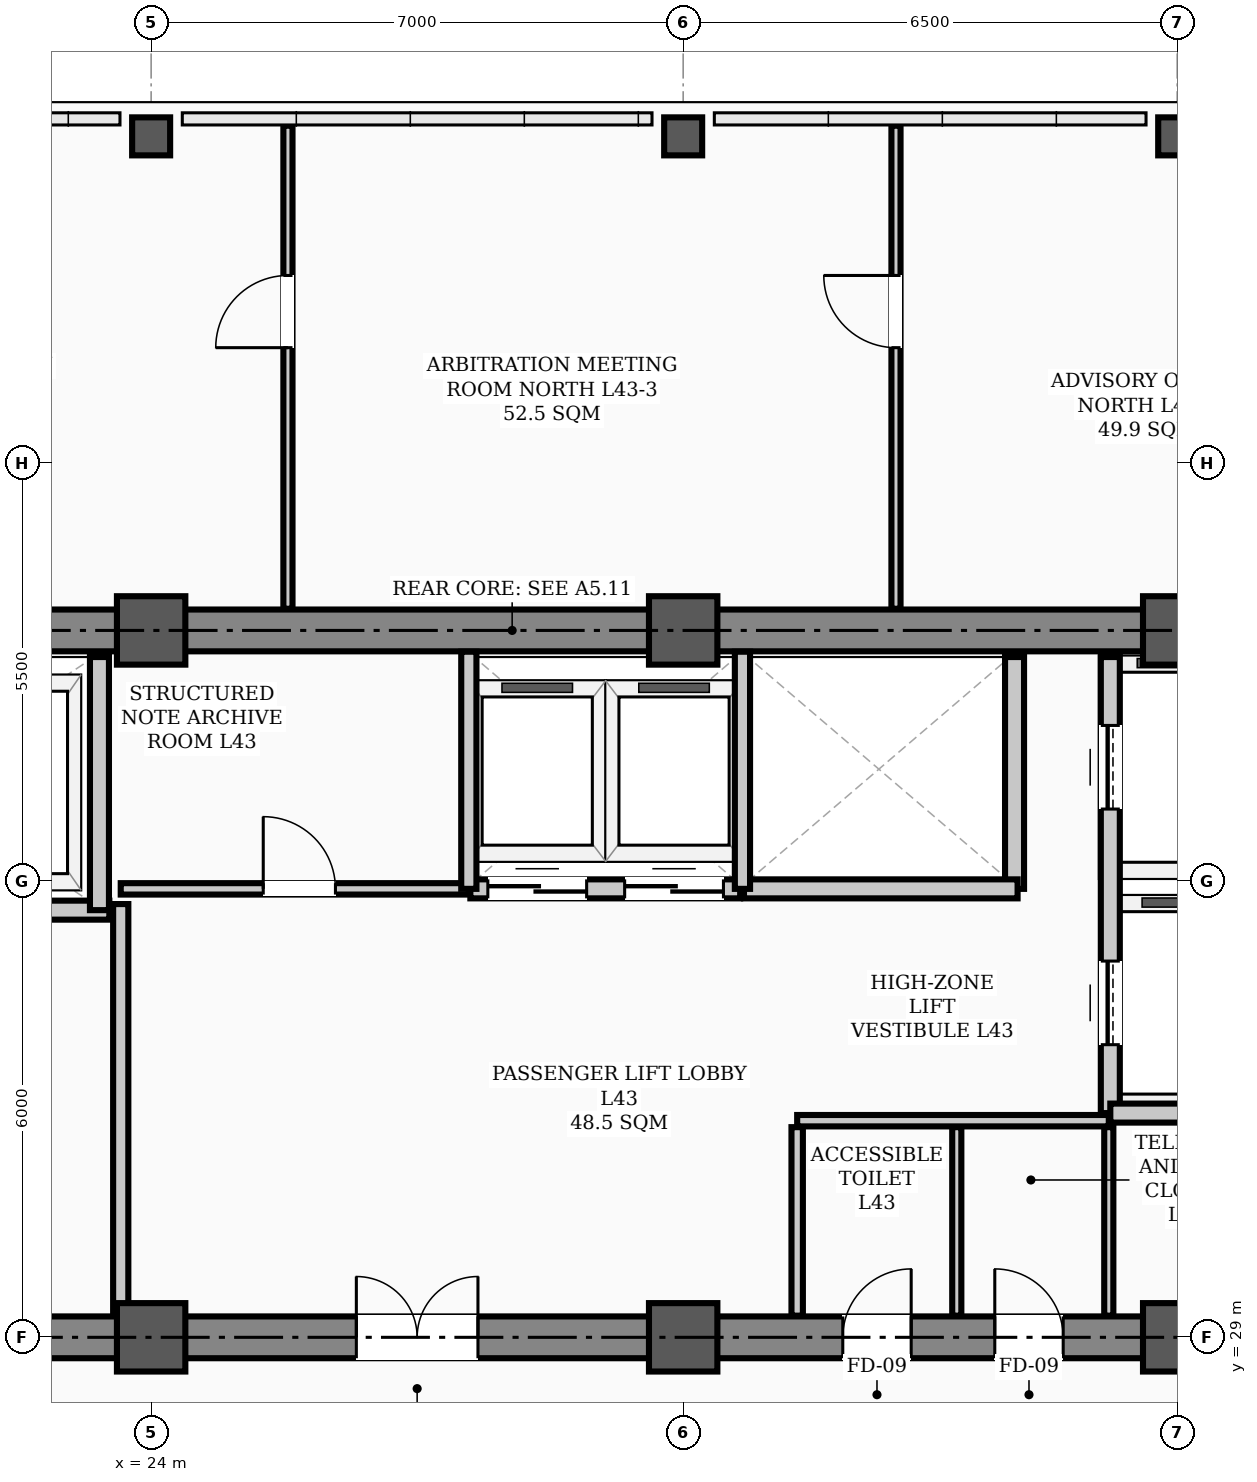
"""IFC4 building model, lengths in metres.
Left out: names, types, materials, properties, quantities, classifications, styles, units other than length and angle.
Written with IfcOpenShell. Run it as: python <this file> out.ifc"""

import sys

from ifc_helpers import new_model, si_unit, direction, frame, frame_2d, origin, origin_2d, place, context, subcontext, project, spatial, rectangle, hollow_rectangle, extrude, element, fill, save


model = new_model("IFC4")
c1 = context("Model", 3, precision=1e-05, world=origin(), true_north=direction((0.0, 1.0)))
c2 = subcontext(c1, "Body", "Model", "MODEL_VIEW")
j1 = project(units=[si_unit("LENGTHUNIT", "METRE"), si_unit("PLANEANGLEUNIT", "RADIAN")], contexts=[c1])
p1 = place(None, origin())
s1 = spatial("IfcSite", under=j1, at=p1, CompositionType="ELEMENT")
p2 = place(p1, origin())
s2 = spatial("IfcBuilding", under=s1, at=p2, CompositionType="ELEMENT")
p3 = place(p2, frame((0.0, 0.0, 173.4)))
s3 = spatial("IfcBuildingStorey", under=s2, at=p3, CompositionType="ELEMENT", Elevation=173.4)
for number, where, z_axis, x_axis in (
    (1, (24.0, 29.0, 0.0), (0.0, 0.0, 1.0), (1.0, 0.0, 0.0)),
    (2, (24.0, 38.3, 0.0), (0.0, 0.0, 1.0), (1.0, 0.0, 0.0)),
    (3, (31.0, 29.0, 0.0), (0.0, 0.0, 1.0), (1.0, 0.0, 0.0)),
    (4, (31.0, 38.3, 0.0), (0.0, 0.0, 1.0), (1.0, 0.0, 0.0)),
    (5, (37.5, 29.0, 0.0), (0.0, 0.0, 1.0), (1.0, 0.0, 0.0)),
    (6, (37.5, 38.3, 0.0), (0.0, 0.0, 1.0), (1.0, 0.0, 0.0)),
):
    element("IfcColumn", number, at=place(p3, frame(where, z_axis=z_axis, x_axis=x_axis)), inside=s3, PredefinedType="COLUMN", context=c2, shape_type="SweptSolid", body=[
        extrude(hollow_rectangle(XDim=0.9, YDim=0.9, WallThickness=0.035, InnerFilletRadius=0.017, OuterFilletRadius=0.052, at=origin_2d()), origin(), (0.0, 0.0, 1.0), 3.9),
    ])
for number, where, z_axis, x_axis in (
    (7, (24.0, 44.8, 0.0), (0.0, 0.0, 1.0), (1.0, 0.0, 0.0)),
    (8, (31.0, 44.8, 0.0), (0.0, 0.0, 1.0), (1.0, 0.0, 0.0)),
    (9, (37.5, 44.8, 0.0), (0.0, 0.0, 1.0), (1.0, 0.0, 0.0)),
):
    element("IfcColumn", number, at=place(p3, frame(where, z_axis=z_axis, x_axis=x_axis)), inside=s3, PredefinedType="COLUMN", context=c2, shape_type="SweptSolid", body=[
        extrude(hollow_rectangle(XDim=0.5, YDim=0.5, WallThickness=0.024, InnerFilletRadius=0.012, OuterFilletRadius=0.036, at=origin_2d()), origin(), (0.0, 0.0, 1.0), 3.9),
    ])
p4 = place(p3, frame((13.5, 29.0, 0.0), z_axis=(0.0, 0.0, 1.0), x_axis=(1.0, 0.0, 0.0)))
e10 = element("IfcWall", 10, at=p4, inside=s3, PredefinedType="SHEAR", context=c2, shape_type="SweptSolid", body=[
    extrude(rectangle(XDim=30.5, YDim=0.55, at=frame_2d((15.25, 0.0))), origin(), (0.0, 0.0, 1.0), 3.72),
])
p5 = place(p4, frame((1.75, 0.0, 0.0)))
e11 = element("IfcOpeningElement", 11, at=p5, cuts=e10, PredefinedType="OPENING", context=c2, shape_type="SweptSolid", body=[
    extrude(rectangle(XDim=1.1, YDim=2.08, at=frame_2d((0.55, 1.04))), frame((0.0, 0.285, 0.0), z_axis=(0.0, -1.0, 0.0), x_axis=(1.0, 0.0, 0.0)), (0.0, 0.0, 1.0), 0.57),
])
p6 = place(p4, frame((26.7, 0.0, 0.0)))
e12 = element("IfcOpeningElement", 12, at=p6, cuts=e10, PredefinedType="OPENING", context=c2, shape_type="SweptSolid", body=[
    extrude(rectangle(XDim=1.1, YDim=2.08, at=frame_2d((0.55, 1.04))), frame((0.0, 0.285, 0.0), z_axis=(0.0, -1.0, 0.0), x_axis=(1.0, 0.0, 0.0)), (0.0, 0.0, 1.0), 0.57),
])
p7 = place(p4, frame((6.8, 0.0, 0.0)))
e13 = element("IfcOpeningElement", 13, at=p7, cuts=e10, PredefinedType="OPENING", context=c2, shape_type="SweptSolid", body=[
    extrude(rectangle(XDim=1.1, YDim=2.08, at=frame_2d((0.55, 1.04))), frame((0.0, 0.285, 0.0), z_axis=(0.0, -1.0, 0.0), x_axis=(1.0, 0.0, 0.0)), (0.0, 0.0, 1.0), 0.57),
])
p8 = place(p4, frame((13.2, 0.0, 0.0)))
e14 = element("IfcOpeningElement", 14, at=p8, cuts=e10, PredefinedType="OPENING", context=c2, shape_type="SweptSolid", body=[
    extrude(rectangle(XDim=1.6, YDim=2.08, at=frame_2d((0.8, 1.04))), frame((0.0, 0.285, 0.0), z_axis=(0.0, -1.0, 0.0), x_axis=(1.0, 0.0, 0.0)), (0.0, 0.0, 1.0), 0.57),
])
p9 = place(p4, frame((19.6, 0.0, 0.0)))
e15 = element("IfcOpeningElement", 15, at=p9, cuts=e10, PredefinedType="OPENING", context=c2, shape_type="SweptSolid", body=[
    extrude(rectangle(XDim=0.9, YDim=2.08, at=frame_2d((0.45, 1.04))), frame((0.0, 0.285, 0.0), z_axis=(0.0, -1.0, 0.0), x_axis=(1.0, 0.0, 0.0)), (0.0, 0.0, 1.0), 0.57),
])
p10 = place(p4, frame((21.6, 0.0, 0.0)))
e16 = element("IfcOpeningElement", 16, at=p10, cuts=e10, PredefinedType="OPENING", context=c2, shape_type="SweptSolid", body=[
    extrude(rectangle(XDim=0.9, YDim=2.08, at=frame_2d((0.45, 1.04))), frame((0.0, 0.285, 0.0), z_axis=(0.0, -1.0, 0.0), x_axis=(1.0, 0.0, 0.0)), (0.0, 0.0, 1.0), 0.57),
])
p11 = place(p3, frame((13.5, 38.3, 0.0), z_axis=(0.0, 0.0, 1.0), x_axis=(1.0, 0.0, 0.0)))
e17 = element("IfcWall", 17, at=p11, inside=s3, PredefinedType="SHEAR", context=c2, shape_type="SweptSolid", body=[
    extrude(rectangle(XDim=30.5, YDim=0.55, at=frame_2d((15.25, 0.0))), origin(), (0.0, 0.0, 1.0), 3.72),
])
p12 = place(p3, frame((18.1, 34.62, 0.0), z_axis=(0.0, 0.0, 1.0), x_axis=(1.0, 0.0, 0.0)))
e18 = element("IfcWall", 18, at=p12, inside=s3, PredefinedType="STANDARD", context=c2, shape_type="SweptSolid", body=[
    extrude(rectangle(XDim=5.35, YDim=0.25, at=frame_2d((2.675, 0.0))), origin(), (0.0, 0.0, 1.0), 3.72),
])
p13 = place(p12, frame((0.85, 0.0, 0.0)))
e19 = element("IfcOpeningElement", 19, at=p13, cuts=e18, PredefinedType="OPENING", context=c2, shape_type="SweptSolid", body=[
    extrude(rectangle(XDim=1.1, YDim=2.08, at=frame_2d((0.55, 1.04))), frame((0.0, 0.135, 0.0), z_axis=(0.0, -1.0, 0.0), x_axis=(1.0, 0.0, 0.0)), (0.0, 0.0, 1.0), 0.27),
])
p14 = place(p12, frame((3.45, 0.0, 0.0)))
e20 = element("IfcOpeningElement", 20, at=p14, cuts=e18, PredefinedType="OPENING", context=c2, shape_type="SweptSolid", body=[
    extrude(rectangle(XDim=1.1, YDim=2.08, at=frame_2d((0.55, 1.04))), frame((0.0, 0.135, 0.0), z_axis=(0.0, -1.0, 0.0), x_axis=(1.0, 0.0, 0.0)), (0.0, 0.0, 1.0), 0.27),
])
p15 = place(p3, frame((36.62, 31.95, 0.0), z_axis=(0.0, 0.0, 1.0), x_axis=(0.0, 1.0, 0.0)))
e21 = element("IfcWall", 21, at=p15, inside=s3, PredefinedType="STANDARD", context=c2, shape_type="SweptSolid", body=[
    extrude(rectangle(XDim=6.0, YDim=0.25, at=frame_2d((3.0, 0.0))), origin(), (0.0, 0.0, 1.0), 3.35),
])
p16 = place(p15, frame((0.9, 0.0, 0.0)))
e22 = element("IfcOpeningElement", 22, at=p16, cuts=e21, PredefinedType="OPENING", context=c2, shape_type="SweptSolid", body=[
    extrude(rectangle(XDim=1.1, YDim=2.08, at=frame_2d((0.55, 1.04))), frame((0.0, 0.135, 0.0), z_axis=(0.0, -1.0, 0.0), x_axis=(1.0, 0.0, 0.0)), (0.0, 0.0, 1.0), 0.27),
])
p17 = place(p15, frame((4.0, 0.0, 0.0)))
e23 = element("IfcOpeningElement", 23, at=p17, cuts=e21, PredefinedType="OPENING", context=c2, shape_type="SweptSolid", body=[
    extrude(rectangle(XDim=1.1, YDim=2.08, at=frame_2d((0.55, 1.04))), frame((0.0, 0.135, 0.0), z_axis=(0.0, -1.0, 0.0), x_axis=(1.0, 0.0, 0.0)), (0.0, 0.0, 1.0), 0.27),
])
p18 = place(p3, frame((36.62, 31.95, 0.0), z_axis=(0.0, 0.0, 1.0), x_axis=(1.0, 0.0, 0.0)))
e24 = element("IfcWall", 24, at=p18, inside=s3, PredefinedType="STANDARD", context=c2, shape_type="SweptSolid", body=[
    extrude(rectangle(XDim=1.9, YDim=0.25, at=frame_2d((0.95, 0.0))), origin(), (0.0, 0.0, 1.0), 3.48),
])
p19 = place(p3, frame((23.32, 34.62, 0.0), z_axis=(0.0, 0.0, 1.0), x_axis=(0.0, 1.0, 0.0)))
e25 = element("IfcWall", 25, at=p19, inside=s3, PredefinedType="STANDARD", context=c2, shape_type="SweptSolid", body=[
    extrude(rectangle(XDim=3.33, YDim=0.25, at=frame_2d((1.665, 0.0))), origin(), (0.0, 0.0, 1.0), 3.35),
])
p20 = place(p3, frame((35.36, 34.9, 0.0), z_axis=(0.0, 0.0, 1.0), x_axis=(0.0, 1.0, 0.0)))
e26 = element("IfcWall", 26, at=p20, inside=s3, PredefinedType="STANDARD", context=c2, shape_type="SweptSolid", body=[
    extrude(rectangle(XDim=3.05, YDim=0.25, at=frame_2d((1.525, 0.0))), origin(), (0.0, 0.0, 1.0), 3.35),
])
p21 = place(p3, frame((28.2, 34.9, 0.0), z_axis=(0.0, 0.0, 1.0), x_axis=(1.0, 0.0, 0.0)))
e27 = element("IfcWall", 27, at=p21, inside=s3, PredefinedType="STANDARD", context=c2, shape_type="SweptSolid", body=[
    extrude(rectangle(XDim=3.55, YDim=0.25, at=frame_2d((1.775, 0.0))), origin(), (0.0, 0.0, 1.0), 3.72),
])
p22 = place(p21, frame((0.23, 0.0, 0.0)))
e28 = element("IfcOpeningElement", 28, at=p22, cuts=e27, PredefinedType="OPENING", context=c2, shape_type="SweptSolid", body=[
    extrude(rectangle(XDim=1.3, YDim=2.08, at=frame_2d((0.65, 1.04))), frame((0.0, 0.135, 0.0), z_axis=(0.0, -1.0, 0.0), x_axis=(1.0, 0.0, 0.0)), (0.0, 0.0, 1.0), 0.27),
])
p23 = place(p21, frame((2.03, 0.0, 0.0)))
e29 = element("IfcOpeningElement", 29, at=p23, cuts=e27, PredefinedType="OPENING", context=c2, shape_type="SweptSolid", body=[
    extrude(rectangle(XDim=1.3, YDim=2.08, at=frame_2d((0.65, 1.04))), frame((0.0, 0.135, 0.0), z_axis=(0.0, -1.0, 0.0), x_axis=(1.0, 0.0, 0.0)), (0.0, 0.0, 1.0), 0.27),
])
p24 = place(p3, frame((31.8, 34.9, 0.0), z_axis=(0.0, 0.0, 1.0), x_axis=(1.0, 0.0, 0.0)))
e30 = element("IfcWall", 30, at=p24, inside=s3, PredefinedType="STANDARD", context=c2, shape_type="SweptSolid", body=[
    extrude(rectangle(XDim=3.6, YDim=0.25, at=frame_2d((1.8, 0.0))), origin(), (0.0, 0.0, 1.0), 3.72),
])
p25 = place(p3, frame((23.6, 34.9, 0.0), z_axis=(0.0, 0.0, 1.0), x_axis=(1.0, 0.0, 0.0)))
e31 = element("IfcWall", 31, at=p25, inside=s3, PredefinedType="PARTITIONING", context=c2, shape_type="SweptSolid", body=[
    extrude(rectangle(XDim=4.58, YDim=0.15, at=frame_2d((2.29, 0.0))), origin(), (0.0, 0.0, 1.0), 3.72),
])
p26 = place(p25, frame((1.875, 0.0, 0.0)))
e32 = element("IfcOpeningElement", 32, at=p26, cuts=e31, PredefinedType="OPENING", context=c2, shape_type="SweptSolid", body=[
    extrude(rectangle(XDim=0.95, YDim=2.08, at=frame_2d((0.475, 1.04))), frame((0.0, 0.085, 0.0), z_axis=(0.0, -1.0, 0.0), x_axis=(1.0, 0.0, 0.0)), (0.0, 0.0, 1.0), 0.17),
])
p27 = place(p3, frame((32.5, 31.85, 0.0), z_axis=(0.0, 0.0, 1.0), x_axis=(1.0, 0.0, 0.0)))
e33 = element("IfcWall", 33, at=p27, inside=s3, PredefinedType="PARTITIONING", context=c2, shape_type="SweptSolid", body=[
    extrude(rectangle(XDim=4.1, YDim=0.15, at=frame_2d((2.05, 0.0))), origin(), (0.0, 0.0, 1.0), 3.72),
])
p28 = place(p3, frame((23.6, 29.285, 0.0), z_axis=(0.0, 0.0, 1.0), x_axis=(0.0, 1.0, 0.0)))
e34 = element("IfcWall", 34, at=p28, inside=s3, PredefinedType="STANDARD", context=c2, shape_type="SweptSolid", body=[
    extrude(rectangle(XDim=5.415, YDim=0.2, at=frame_2d((2.708, 0.0))), origin(), (0.0, 0.0, 1.0), 3.2),
])
p29 = place(p3, frame((32.5, 29.285, 0.0), z_axis=(0.0, 0.0, 1.0), x_axis=(0.0, 1.0, 0.0)))
e35 = element("IfcWall", 35, at=p29, inside=s3, PredefinedType="PARTITIONING", context=c2, shape_type="SweptSolid", body=[
    extrude(rectangle(XDim=2.48, YDim=0.15, at=frame_2d((1.24, 0.0))), origin(), (0.0, 0.0, 1.0), 3.35),
])
for number, where, z_axis, x_axis in (
    (36, (36.6, 29.285, 0.0), (0.0, 0.0, 1.0), (0.0, 1.0, 0.0)),
    (37, (34.6, 29.285, 0.0), (0.0, 0.0, 1.0), (0.0, 1.0, 0.0)),
):
    element("IfcWall", number, at=place(p3, frame(where, z_axis=z_axis, x_axis=x_axis)), inside=s3, PredefinedType="PARTITIONING", context=c2, shape_type="SweptSolid", body=[
        extrude(rectangle(XDim=2.48, YDim=0.12, at=frame_2d((1.24, 0.0))), origin(), (0.0, 0.0, 1.0), 3.35),
    ])
p30 = place(p3, frame((25.8, 38.585, 0.0), z_axis=(0.0, 0.0, 1.0), x_axis=(0.0, 1.0, 0.0)))
e38 = element("IfcWall", 38, at=p30, inside=s3, PredefinedType="PARTITIONING", context=c2, shape_type="SweptSolid", body=[
    extrude(rectangle(XDim=6.355, YDim=0.12, at=frame_2d((3.177, 0.0))), origin(), (0.0, 0.0, 1.0), 3.212),
])
p31 = place(p30, frame((3.435, 0.0, 0.0)))
e39 = element("IfcOpeningElement", 39, at=p31, cuts=e38, PredefinedType="OPENING", context=c2, shape_type="SweptSolid", body=[
    extrude(rectangle(XDim=0.95, YDim=2.08, at=frame_2d((0.475, 1.04))), frame((0.0, 0.07, 0.0), z_axis=(0.0, -1.0, 0.0), x_axis=(1.0, 0.0, 0.0)), (0.0, 0.0, 1.0), 0.14),
])
p32 = place(p3, frame((33.8, 38.585, 0.0), z_axis=(0.0, 0.0, 1.0), x_axis=(0.0, 1.0, 0.0)))
e40 = element("IfcWall", 40, at=p32, inside=s3, PredefinedType="PARTITIONING", context=c2, shape_type="SweptSolid", body=[
    extrude(rectangle(XDim=6.355, YDim=0.12, at=frame_2d((3.177, 0.0))), origin(), (0.0, 0.0, 1.0), 3.212),
])
p33 = place(p32, frame((3.435, 0.0, 0.0)))
e41 = element("IfcOpeningElement", 41, at=p33, cuts=e40, PredefinedType="OPENING", context=c2, shape_type="SweptSolid", body=[
    extrude(rectangle(XDim=0.95, YDim=2.08, at=frame_2d((0.475, 1.04))), frame((0.0, 0.07, 0.0), z_axis=(0.0, -1.0, 0.0), x_axis=(1.0, 0.0, 0.0)), (0.0, 0.0, 1.0), 0.14),
])
for number, where, z_axis, x_axis in (
    (42, (28.18, 34.9, 0.0), (0.0, 0.0, 1.0), (0.0, 1.0, 0.0)),
    (43, (31.78, 34.9, 0.0), (0.0, 0.0, 1.0), (0.0, 1.0, 0.0)),
):
    element("IfcWall", number, at=place(p3, frame(where, z_axis=z_axis, x_axis=x_axis)), inside=s3, PredefinedType="STANDARD", context=c2, shape_type="SweptSolid", body=[
        extrude(rectangle(XDim=3.12, YDim=0.2, at=frame_2d((1.56, 0.0))), origin(), (0.0, 0.0, 1.0), 3.35),
    ])
p34 = place(p8, origin())
e44 = element("IfcDoor", 44, at=p34, inside=s3, OperationType="DOUBLE_DOOR_SINGLE_SWING", PredefinedType="DOOR", context=c2, shape_type="SweptSolid", body=[
    extrude(rectangle(XDim=1.6, YDim=2.08, at=frame_2d((0.8, 1.04))), frame((0.0, 0.025, 0.0), z_axis=(0.0, -1.0, 0.0), x_axis=(1.0, 0.0, 0.0)), (0.0, 0.0, 1.0), 0.05),
])
fill(e14, e44)
p35 = place(p26, origin())
e45 = element("IfcDoor", 45, at=p35, inside=s3, OperationType="SINGLE_SWING_LEFT", PredefinedType="DOOR", context=c2, shape_type="SweptSolid", body=[
    extrude(rectangle(XDim=0.95, YDim=2.08, at=frame_2d((0.475, 1.04))), frame((0.0, 0.025, 0.0), z_axis=(0.0, -1.0, 0.0), x_axis=(1.0, 0.0, 0.0)), (0.0, 0.0, 1.0), 0.05),
])
fill(e32, e45)
p36 = place(p9, origin())
e46 = element("IfcDoor", 46, at=p36, inside=s3, OperationType="SINGLE_SWING_RIGHT", PredefinedType="DOOR", context=c2, shape_type="SweptSolid", body=[
    extrude(rectangle(XDim=0.9, YDim=2.08, at=frame_2d((0.45, 1.04))), frame((0.0, 0.025, 0.0), z_axis=(0.0, -1.0, 0.0), x_axis=(1.0, 0.0, 0.0)), (0.0, 0.0, 1.0), 0.05),
])
fill(e15, e46)
p37 = place(p10, origin())
e47 = element("IfcDoor", 47, at=p37, inside=s3, OperationType="SINGLE_SWING_LEFT", PredefinedType="DOOR", context=c2, shape_type="SweptSolid", body=[
    extrude(rectangle(XDim=0.9, YDim=2.08, at=frame_2d((0.45, 1.04))), frame((0.0, 0.025, 0.0), z_axis=(0.0, -1.0, 0.0), x_axis=(1.0, 0.0, 0.0)), (0.0, 0.0, 1.0), 0.05),
])
fill(e16, e47)
p38 = place(p31, origin())
e48 = element("IfcDoor", 48, at=p38, inside=s3, OperationType="SINGLE_SWING_LEFT", PredefinedType="DOOR", context=c2, shape_type="SweptSolid", body=[
    extrude(rectangle(XDim=0.95, YDim=2.08, at=frame_2d((0.475, 1.04))), frame((0.0, 0.025, 0.0), z_axis=(0.0, -1.0, 0.0), x_axis=(1.0, 0.0, 0.0)), (0.0, 0.0, 1.0), 0.05),
])
fill(e39, e48)
p39 = place(p33, origin())
e49 = element("IfcDoor", 49, at=p39, inside=s3, OperationType="SINGLE_SWING_RIGHT", PredefinedType="DOOR", context=c2, shape_type="SweptSolid", body=[
    extrude(rectangle(XDim=0.95, YDim=2.08, at=frame_2d((0.475, 1.04))), frame((0.0, 0.025, 0.0), z_axis=(0.0, -1.0, 0.0), x_axis=(1.0, 0.0, 0.0)), (0.0, 0.0, 1.0), 0.05),
])
fill(e41, e49)
p40 = place(p16, origin())
e50 = element("IfcDoor", 50, at=p40, inside=s3, OperationType="SLIDING_TO_LEFT", PredefinedType="DOOR", context=c2, shape_type="SweptSolid", body=[
    extrude(rectangle(XDim=1.1, YDim=2.08, at=frame_2d((0.55, 1.04))), frame((0.0, 0.025, 0.0), z_axis=(0.0, -1.0, 0.0), x_axis=(1.0, 0.0, 0.0)), (0.0, 0.0, 1.0), 0.05),
])
fill(e22, e50)
p41 = place(p17, origin())
e51 = element("IfcDoor", 51, at=p41, inside=s3, OperationType="SLIDING_TO_LEFT", PredefinedType="DOOR", context=c2, shape_type="SweptSolid", body=[
    extrude(rectangle(XDim=1.1, YDim=2.08, at=frame_2d((0.55, 1.04))), frame((0.0, 0.025, 0.0), z_axis=(0.0, -1.0, 0.0), x_axis=(1.0, 0.0, 0.0)), (0.0, 0.0, 1.0), 0.05),
])
fill(e23, e51)
p42 = place(p22, origin())
e52 = element("IfcDoor", 52, at=p42, inside=s3, OperationType="DOUBLE_DOOR_SLIDING", PredefinedType="DOOR", context=c2, shape_type="SweptSolid", body=[
    extrude(rectangle(XDim=1.3, YDim=2.08, at=frame_2d((0.65, 1.04))), frame((0.0, 0.025, 0.0), z_axis=(0.0, -1.0, 0.0), x_axis=(1.0, 0.0, 0.0)), (0.0, 0.0, 1.0), 0.05),
])
fill(e28, e52)
p43 = place(p23, origin())
e53 = element("IfcDoor", 53, at=p43, inside=s3, OperationType="DOUBLE_DOOR_SLIDING", PredefinedType="DOOR", context=c2, shape_type="SweptSolid", body=[
    extrude(rectangle(XDim=1.3, YDim=2.08, at=frame_2d((0.65, 1.04))), frame((0.0, 0.025, 0.0), z_axis=(0.0, -1.0, 0.0), x_axis=(1.0, 0.0, 0.0)), (0.0, 0.0, 1.0), 0.05),
])
fill(e29, e53)
save(model, sys.argv[1])
